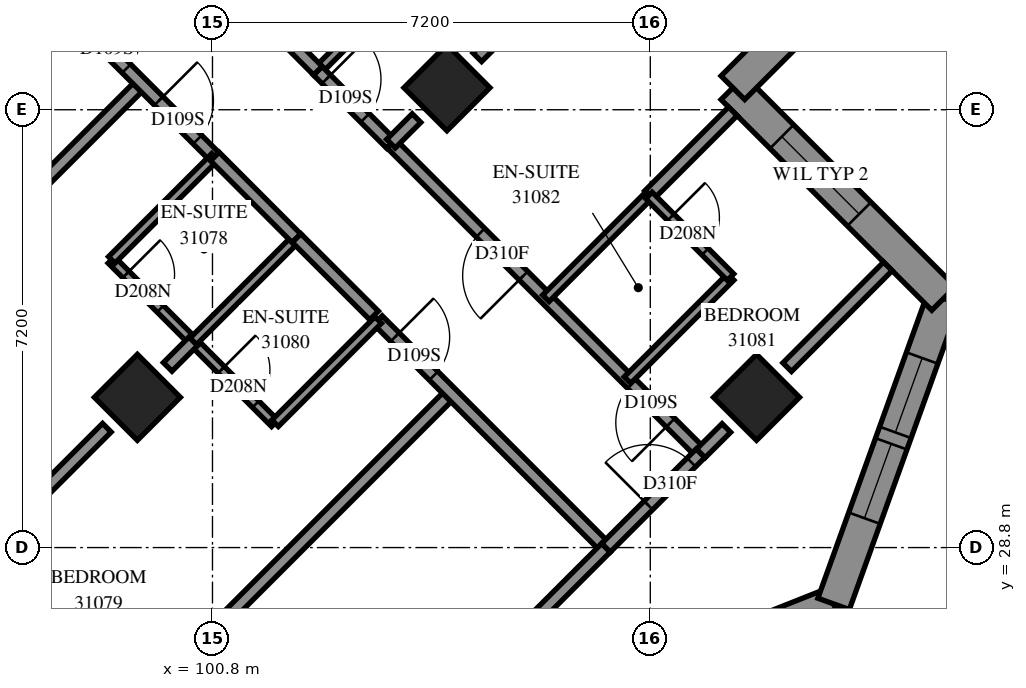
"""IFC4 building model, lengths in metres.
Left out: names, types, materials, properties, quantities, classifications, styles, units other than length and angle.
Written with IfcOpenShell. Run it as: python <this file> out.ifc"""

import sys

from ifc_helpers import new_model, si_unit, direction, frame, frame_2d, origin, origin_2d, place, context, subcontext, project, spatial, polyline, rectangle, outline, extrude, element, fill, save


model = new_model("IFC4")
c1 = context("Model", 3, precision=1e-05, world=origin(), true_north=direction((0.0, 1.0)))
c2 = subcontext(c1, "Body", "Model", "MODEL_VIEW")
j1 = project(units=[si_unit("LENGTHUNIT", "METRE"), si_unit("PLANEANGLEUNIT", "RADIAN")], contexts=[c1])
p1 = place(None, origin())
s1 = spatial("IfcSite", under=j1, at=p1, CompositionType="ELEMENT")
p2 = place(p1, origin())
s2 = spatial("IfcBuilding", under=s1, at=p2, CompositionType="ELEMENT")
p3 = place(p2, frame((0.0, 0.0, 115.2)))
s3 = spatial("IfcBuildingStorey", under=s2, at=p3, CompositionType="ELEMENT", Elevation=115.2)
for number, where, z_axis, x_axis in (
    (1, (104.656, 36.362, 0.0), (0.0, 0.0, 1.0), (0.707, -0.707, 0.0)),
    (2, (99.565, 31.271, 0.0), (0.0, 0.0, 1.0), (0.707, -0.707, 0.0)),
    (3, (109.747, 31.271, 0.0), (0.0, 0.0, 1.0), (0.707, -0.707, 0.0)),
):
    element("IfcColumn", number, at=place(p3, frame(where, z_axis=z_axis, x_axis=x_axis)), inside=s3, PredefinedType="COLUMN", context=c2, shape_type="SweptSolid", body=[
        extrude(rectangle(XDim=1.0, YDim=1.0, at=origin_2d()), origin(), (0.0, 0.0, 1.0), 3.1),
    ])
p4 = place(p3, frame((105.857, 25.825, 0.0), z_axis=(0.0, 0.0, 1.0), x_axis=(0.9293292169, 0.3692522262, 0.0)))
e4 = element("IfcWall", 4, at=p4, inside=s3, PredefinedType="SOLIDWALL", context=c2, shape_type="SweptSolid", body=[
    extrude(outline(polyline([(0.119, -0.275), (5.674, -0.275), (5.426, 0.275), (-0.119, 0.275), (0.119, -0.275)])), origin(), (0.0, 0.0, 1.0), 3.1),
])
p5 = place(p4, frame((0.653, 0.0, 0.5)))
e5 = element("IfcOpeningElement", 5, at=p5, cuts=e4, PredefinedType="OPENING", context=c2, shape_type="SweptSolid", body=[
    extrude(rectangle(XDim=1.2, YDim=2.45, at=frame_2d((0.6, 1.225))), frame((0.0, 0.285, 0.0), z_axis=(0.0, -1.0, 0.0), x_axis=(1.0, 0.0, 0.0)), (0.0, 0.0, 1.0), 0.57),
])
p6 = place(p4, frame((3.166, 0.0, 0.5)))
e6 = element("IfcOpeningElement", 6, at=p6, cuts=e4, PredefinedType="OPENING", context=c2, shape_type="SweptSolid", body=[
    extrude(rectangle(XDim=1.2, YDim=2.45, at=frame_2d((0.6, 1.225))), frame((0.0, 0.285, 0.0), z_axis=(0.0, -1.0, 0.0), x_axis=(1.0, 0.0, 0.0)), (0.0, 0.0, 1.0), 0.57),
])
p7 = place(p3, frame((111.015, 27.874, 0.0), z_axis=(0.0, 0.0, 1.0), x_axis=(0.3387725306, 0.9408683077, 0.0)))
e7 = element("IfcWall", 7, at=p7, inside=s3, PredefinedType="SOLIDWALL", context=c2, shape_type="SweptSolid", body=[
    extrude(outline(polyline([(-0.124, -0.275), (5.513, -0.275), (5.164, 0.275), (0.124, 0.275), (-0.124, -0.275)])), origin(), (0.0, 0.0, 1.0), 3.1),
])
p8 = place(p7, frame((1.498, 0.0, 0.5)))
e8 = element("IfcOpeningElement", 8, at=p8, cuts=e7, PredefinedType="OPENING", context=c2, shape_type="SweptSolid", body=[
    extrude(rectangle(XDim=1.3, YDim=2.45, at=frame_2d((0.65, 1.225))), frame((0.0, 0.285, 0.0), z_axis=(0.0, -1.0, 0.0), x_axis=(1.0, 0.0, 0.0)), (0.0, 0.0, 1.0), 0.57),
])
p9 = place(p7, frame((2.998, 0.0, 0.5)))
e9 = element("IfcOpeningElement", 9, at=p9, cuts=e7, PredefinedType="OPENING", context=c2, shape_type="SweptSolid", body=[
    extrude(rectangle(XDim=1.3, YDim=2.45, at=frame_2d((0.65, 1.225))), frame((0.0, 0.285, 0.0), z_axis=(0.0, -1.0, 0.0), x_axis=(1.0, 0.0, 0.0)), (0.0, 0.0, 1.0), 0.57),
])
p10 = place(p3, frame((112.823, 32.897, 0.0), z_axis=(0.0, 0.0, 1.0), x_axis=(-0.7071067812, 0.7071067812, 0.0)))
e10 = element("IfcWall", 10, at=p10, inside=s3, PredefinedType="SOLIDWALL", context=c2, shape_type="SweptSolid", body=[
    extrude(outline(polyline([(-0.174, -0.275), (4.625, -0.275), (5.176, 0.275), (0.174, 0.275), (-0.174, -0.275)])), origin(), (0.0, 0.0, 1.0), 3.1),
])
p11 = place(p10, frame((1.963, 0.0, 0.6)))
e11 = element("IfcOpeningElement", 11, at=p11, cuts=e10, PredefinedType="OPENING", context=c2, shape_type="SweptSolid", body=[
    extrude(rectangle(XDim=1.8, YDim=1.9, at=frame_2d((0.9, 0.95))), frame((0.0, 0.285, 0.0), z_axis=(0.0, -1.0, 0.0), x_axis=(1.0, 0.0, 0.0)), (0.0, 0.0, 1.0), 0.57),
])
p12 = place(p3, frame((109.358, 36.362, 0.0), z_axis=(0.0, 0.0, 1.0), x_axis=(0.7071067812, 0.7071067812, 0.0)))
e12 = element("IfcWall", 12, at=p12, inside=s3, PredefinedType="SOLIDWALL", context=c2, shape_type="SweptSolid", body=[
    extrude(outline(polyline([(0.275, -0.275), (6.278, -0.275), (5.501, 0.275), (-0.275, 0.275), (0.275, -0.275)])), origin(), (0.0, 0.0, 1.0), 3.1),
])
p13 = place(p12, frame((1.137, 0.0, 0.6)))
e13 = element("IfcOpeningElement", 13, at=p13, cuts=e12, PredefinedType="OPENING", context=c2, shape_type="SweptSolid", body=[
    extrude(rectangle(XDim=1.8, YDim=1.9, at=frame_2d((0.9, 0.95))), frame((0.0, 0.285, 0.0), z_axis=(0.0, -1.0, 0.0), x_axis=(1.0, 0.0, 0.0)), (0.0, 0.0, 1.0), 0.57),
])
p14 = place(p12, frame((3.988, 0.0, 0.6)))
e14 = element("IfcOpeningElement", 14, at=p14, cuts=e12, PredefinedType="OPENING", context=c2, shape_type="SweptSolid", body=[
    extrude(rectangle(XDim=1.2, YDim=1.9, at=frame_2d((0.6, 0.95))), frame((0.0, 0.285, 0.0), z_axis=(0.0, -1.0, 0.0), x_axis=(1.0, 0.0, 0.0)), (0.0, 0.0, 1.0), 0.57),
])
p15 = place(p3, frame((96.469, 23.086, 0.0), z_axis=(0.0, 0.0, 1.0), x_axis=(0.7071067812, 0.7071067812, 0.0)))
e15 = element("IfcWall", 15, at=p15, inside=s3, PredefinedType="PARTITIONING", context=c2, shape_type="SweptSolid", body=[
    extrude(rectangle(XDim=11.677, YDim=0.2, at=frame_2d((5.838, 0.0))), origin(), (0.0, 0.0, 1.0), 3.1),
])
p16 = place(p3, frame((91.451, 28.249, 0.0), z_axis=(0.0, 0.0, 1.0), x_axis=(0.7071067812, 0.7071067812, 0.0)))
e16 = element("IfcWall", 16, at=p16, inside=s3, PredefinedType="PARTITIONING", context=c2, shape_type="SweptSolid", body=[
    extrude(rectangle(XDim=11.574, YDim=0.2, at=frame_2d((5.787, 0.0))), origin(), (0.0, 0.0, 1.0), 3.1),
])
p17 = place(p3, frame((94.047, 42.015, 0.0), z_axis=(0.0, 0.0, 1.0), x_axis=(0.7071067812, -0.7071067812, 0.0)))
e17 = element("IfcWall", 17, at=p17, inside=s3, PredefinedType="PARTITIONING", context=c2, shape_type="SweptSolid", body=[
    extrude(rectangle(XDim=9.6, YDim=0.2, at=frame_2d((4.8, 0.0))), origin(), (0.0, 0.0, 1.0), 3.1),
])
p18 = place(p17, frame((1.099, 0.0, 0.0)))
e18 = element("IfcOpeningElement", 18, at=p18, cuts=e17, PredefinedType="OPENING", context=c2, shape_type="SweptSolid", body=[
    extrude(rectangle(XDim=0.9, YDim=2.1, at=frame_2d((0.45, 1.05))), frame((0.0, 0.11, 0.0), z_axis=(0.0, -1.0, 0.0), x_axis=(1.0, 0.0, 0.0)), (0.0, 0.0, 1.0), 0.22),
])
p19 = place(p17, frame((6.649, 0.0, 0.0)))
e19 = element("IfcOpeningElement", 19, at=p19, cuts=e17, PredefinedType="OPENING", context=c2, shape_type="SweptSolid", body=[
    extrude(rectangle(XDim=0.9, YDim=2.1, at=frame_2d((0.45, 1.05))), frame((0.0, 0.11, 0.0), z_axis=(0.0, -1.0, 0.0), x_axis=(1.0, 0.0, 0.0)), (0.0, 0.0, 1.0), 0.22),
])
p20 = place(p17, frame((8.3, 0.0, 0.0)))
e20 = element("IfcOpeningElement", 20, at=p20, cuts=e17, PredefinedType="OPENING", context=c2, shape_type="SweptSolid", body=[
    extrude(rectangle(XDim=0.9, YDim=2.1, at=frame_2d((0.45, 1.05))), frame((0.0, 0.11, 0.0), z_axis=(0.0, -1.0, 0.0), x_axis=(1.0, 0.0, 0.0)), (0.0, 0.0, 1.0), 0.22),
])
p21 = place(p3, frame((108.831, 30.355, 0.0), z_axis=(0.0, 0.0, 1.0), x_axis=(-0.7073012053, 0.7069123036, 0.0)))
e21 = element("IfcWall", 21, at=p21, inside=s3, PredefinedType="PARTITIONING", context=c2, shape_type="SweptSolid", body=[
    extrude(rectangle(XDim=7.2, YDim=0.2, at=frame_2d((3.6, 0.0))), origin(), (0.0, 0.0, 1.0), 2.6),
])
p22 = place(p21, frame((4.125, 0.0, 0.0)))
e22 = element("IfcOpeningElement", 22, at=p22, cuts=e21, PredefinedType="OPENING", context=c2, shape_type="SweptSolid", body=[
    extrude(rectangle(XDim=1.0, YDim=2.1, at=frame_2d((0.5, 1.05))), frame((0.0, 0.11, 0.0), z_axis=(0.0, -1.0, 0.0), x_axis=(1.0, 0.0, 0.0)), (0.0, 0.0, 1.0), 0.22),
])
p23 = place(p21, frame((0.705, 0.0, 0.0)))
e23 = element("IfcOpeningElement", 23, at=p23, cuts=e21, PredefinedType="OPENING", context=c2, shape_type="SweptSolid", body=[
    extrude(rectangle(XDim=0.9, YDim=2.1, at=frame_2d((0.45, 1.05))), frame((0.0, 0.11, 0.0), z_axis=(0.0, -1.0, 0.0), x_axis=(1.0, 0.0, 0.0)), (0.0, 0.0, 1.0), 0.22),
])
p24 = place(p3, frame((105.155, 36.863, 0.0), z_axis=(0.0, 0.0, 1.0), x_axis=(0.7071067812, 0.7071067812, 0.0)))
e24 = element("IfcWall", 24, at=p24, inside=s3, PredefinedType="PARTITIONING", context=c2, shape_type="SweptSolid", body=[
    extrude(rectangle(XDim=5.787, YDim=0.2, at=frame_2d((2.893, 0.0))), origin(), (0.0, 0.0, 1.0), 3.1),
])
p25 = place(p3, frame((94.973, 26.681, 0.0), z_axis=(0.0, 0.0, 1.0), x_axis=(0.7071067812, 0.7071067812, 0.0)))
e25 = element("IfcWall", 25, at=p25, inside=s3, PredefinedType="PARTITIONING", context=c2, shape_type="SweptSolid", body=[
    extrude(rectangle(XDim=5.784, YDim=0.2, at=frame_2d((2.892, 0.0))), origin(), (0.0, 0.0, 1.0), 3.1),
])
p26 = place(p3, frame((103.521, 32.541, 0.0), z_axis=(0.0, 0.0, 1.0), x_axis=(0.7071067812, -0.7071067812, 0.0)))
e26 = element("IfcWall", 26, at=p26, inside=s3, PredefinedType="PARTITIONING", context=c2, shape_type="SweptSolid", body=[
    extrude(rectangle(XDim=5.301, YDim=0.2, at=frame_2d((2.65, 0.0))), origin(), (0.0, 0.0, 1.0), 3.1),
])
p27 = place(p26, frame((0.396, 0.0, 0.0)))
e27 = element("IfcOpeningElement", 27, at=p27, cuts=e26, PredefinedType="OPENING", context=c2, shape_type="SweptSolid", body=[
    extrude(rectangle(XDim=0.9, YDim=2.1, at=frame_2d((0.45, 1.05))), frame((0.0, 0.11, 0.0), z_axis=(0.0, -1.0, 0.0), x_axis=(1.0, 0.0, 0.0)), (0.0, 0.0, 1.0), 0.22),
])
p28 = place(p3, frame((99.137, 33.531, 0.0), z_axis=(0.0, 0.0, 1.0), x_axis=(0.7071067812, -0.7071067812, 0.0)))
e28 = element("IfcWall", 28, at=p28, inside=s3, PredefinedType="PARTITIONING", context=c2, shape_type="SweptSolid", body=[
    extrude(rectangle(XDim=3.801, YDim=0.15, at=frame_2d((1.901, 0.0))), origin(), (0.0, 0.0, 1.0), 3.1),
])
p29 = place(p28, frame((0.339, 0.0, 0.0)))
e29 = element("IfcOpeningElement", 29, at=p29, cuts=e28, PredefinedType="OPENING", context=c2, shape_type="SweptSolid", body=[
    extrude(rectangle(XDim=0.8, YDim=2.1, at=frame_2d((0.4, 1.05))), frame((0.0, 0.085, 0.0), z_axis=(0.0, -1.0, 0.0), x_axis=(1.0, 0.0, 0.0)), (0.0, 0.0, 1.0), 0.17),
])
p30 = place(p28, frame((2.557, 0.0, 0.0)))
e30 = element("IfcOpeningElement", 30, at=p30, cuts=e28, PredefinedType="OPENING", context=c2, shape_type="SweptSolid", body=[
    extrude(rectangle(XDim=0.8, YDim=2.1, at=frame_2d((0.4, 1.05))), frame((0.0, 0.085, 0.0), z_axis=(0.0, -1.0, 0.0), x_axis=(1.0, 0.0, 0.0)), (0.0, 0.0, 1.0), 0.17),
])
p31 = place(p3, frame((105.155, 26.681, 0.0), z_axis=(0.0, 0.0, 1.0), x_axis=(0.7071067812, 0.7071067812, 0.0)))
e31 = element("IfcWall", 31, at=p31, inside=s3, PredefinedType="PARTITIONING", context=c2, shape_type="SweptSolid", body=[
    extrude(rectangle(XDim=2.993, YDim=0.2, at=frame_2d((1.496, 0.0))), origin(), (0.0, 0.0, 1.0), 2.6),
])
p32 = place(p3, frame((102.533, 36.645, 0.0), z_axis=(0.0, 0.0, 1.0), x_axis=(0.7071067812, 0.7071067812, 0.0)))
e32 = element("IfcWall", 32, at=p32, inside=s3, PredefinedType="PARTITIONING", context=c2, shape_type="SweptSolid", body=[
    extrude(rectangle(XDim=2.401, YDim=0.15, at=frame_2d((1.201, 0.0))), origin(), (0.0, 0.0, 1.0), 3.1),
])
for number, where, z_axis, x_axis in (
    (33, (96.739, 35.935, 0.0), (0.0, 0.0, 1.0), (0.708, 0.707, 0.0)),
    (34, (99.143, 33.531, 0.0), (0.0, 0.0, 1.0), (0.708, 0.707, 0.0)),
    (35, (101.83, 30.844, 0.0), (0.0, 0.0, 1.0), (0.707, 0.708, 0.0)),
):
    element("IfcWall", number, at=place(p3, frame(where, z_axis=z_axis, x_axis=x_axis)), inside=s3, PredefinedType="PARTITIONING", context=c2, shape_type="SweptSolid", body=[
        extrude(rectangle(XDim=2.4, YDim=0.15, at=frame_2d((1.2, 0.0))), origin(), (0.0, 0.0, 1.0), 3.1),
    ])
for number, where, z_axis, x_axis in (
    (36, (100.483, 32.191, 0.0), (0.0, 0.0, 1.0), (0.707, 0.707, 0.0)),
    (37, (106.283, 32.899, 0.0), (0.0, 0.0, 1.0), (0.707, 0.707, 0.0)),
):
    element("IfcWall", number, at=place(p3, frame(where, z_axis=z_axis, x_axis=x_axis)), inside=s3, PredefinedType="PARTITIONING", context=c2, shape_type="SweptSolid", body=[
        extrude(rectangle(XDim=2.398, YDim=0.15, at=frame_2d((1.199, 0.0))), origin(), (0.0, 0.0, 1.0), 3.1),
    ])
p33 = place(p3, frame((107.625, 31.555, 0.0), z_axis=(0.0, 0.0, 1.0), x_axis=(0.7071067812, 0.7071067812, 0.0)))
e38 = element("IfcWall", 38, at=p33, inside=s3, PredefinedType="PARTITIONING", context=c2, shape_type="SweptSolid", body=[
    extrude(rectangle(XDim=2.398, YDim=0.15, at=frame_2d((1.199, 0.0))), origin(), (0.0, 0.0, 1.0), 2.6),
])
p34 = place(p3, frame((110.251, 31.767, 0.0), z_axis=(0.0, 0.0, 1.0), x_axis=(0.7066584143, 0.7075548639, 0.0)))
e39 = element("IfcWall", 39, at=p34, inside=s3, PredefinedType="PARTITIONING", context=c2, shape_type="SweptSolid", body=[
    extrude(rectangle(XDim=2.343, YDim=0.2, at=frame_2d((1.171, 0.0))), origin(), (0.0, 0.0, 1.0), 3.1),
])
p35 = place(p3, frame((107.271, 28.797, 0.0), z_axis=(0.0, 0.0, 1.0), x_axis=(0.7071067812, 0.7071067812, 0.0)))
e40 = element("IfcWall", 40, at=p35, inside=s3, PredefinedType="PARTITIONING", context=c2, shape_type="SweptSolid", body=[
    extrude(rectangle(XDim=2.2, YDim=0.2, at=frame_2d((1.1, 0.0))), origin(), (0.0, 0.0, 1.0), 2.6),
])
p36 = place(p35, frame((0.987, 0.0, 0.0)))
e41 = element("IfcOpeningElement", 41, at=p36, cuts=e40, PredefinedType="OPENING", context=c2, shape_type="SweptSolid", body=[
    extrude(rectangle(XDim=1.0, YDim=2.1, at=frame_2d((0.5, 1.05))), frame((0.0, 0.11, 0.0), z_axis=(0.0, -1.0, 0.0), x_axis=(1.0, 0.0, 0.0)), (0.0, 0.0, 1.0), 0.22),
])
p37 = place(p3, frame((107.979, 34.595, 0.0), z_axis=(0.0, 0.0, 1.0), x_axis=(0.7071067812, 0.7071067812, 0.0)))
e42 = element("IfcWall", 42, at=p37, inside=s3, PredefinedType="PARTITIONING", context=c2, shape_type="SweptSolid", body=[
    extrude(rectangle(XDim=1.95, YDim=0.2, at=frame_2d((0.975, 0.0))), origin(), (0.0, 0.0, 1.0), 3.1),
])
p38 = place(p3, frame((100.839, 35.231, 0.0), z_axis=(0.0, 0.0, 1.0), x_axis=(0.7065800724, -0.7076330979, 0.0)))
e43 = element("IfcWall", 43, at=p38, inside=s3, PredefinedType="PARTITIONING", context=c2, shape_type="SweptSolid", body=[
    extrude(rectangle(XDim=1.899, YDim=0.2, at=frame_2d((0.95, 0.0))), origin(), (0.0, 0.0, 1.0), 3.1),
])
p39 = place(p3, frame((107.977, 34.591, 0.0), z_axis=(0.0, 0.0, 1.0), x_axis=(0.7065800724, -0.7076330979, 0.0)))
e44 = element("IfcWall", 44, at=p39, inside=s3, PredefinedType="PARTITIONING", context=c2, shape_type="SweptSolid", body=[
    extrude(rectangle(XDim=1.899, YDim=0.15, at=frame_2d((0.95, 0.0))), origin(), (0.0, 0.0, 1.0), 3.1),
])
p40 = place(p39, frame((0.508, 0.0, 0.0)))
e45 = element("IfcOpeningElement", 45, at=p40, cuts=e44, PredefinedType="OPENING", context=c2, shape_type="SweptSolid", body=[
    extrude(rectangle(XDim=0.8, YDim=2.1, at=frame_2d((0.4, 1.05))), frame((0.0, 0.085, 0.0), z_axis=(0.0, -1.0, 0.0), x_axis=(1.0, 0.0, 0.0)), (0.0, 0.0, 1.0), 0.17),
])
p41 = place(p3, frame((102.183, 33.889, 0.0), z_axis=(0.0, 0.0, 1.0), x_axis=(0.7076620277, -0.7065510983, 0.0)))
e46 = element("IfcWall", 46, at=p41, inside=s3, PredefinedType="PARTITIONING", context=c2, shape_type="SweptSolid", body=[
    extrude(rectangle(XDim=1.8, YDim=0.2, at=frame_2d((0.9, 0.0))), origin(), (0.0, 0.0, 1.0), 3.1),
])
p42 = place(p3, frame((102.531, 36.641, 0.0), z_axis=(0.0, 0.0, 1.0), x_axis=(0.7071067812, -0.7071067812, 0.0)))
e47 = element("IfcWall", 47, at=p42, inside=s3, PredefinedType="PARTITIONING", context=c2, shape_type="SweptSolid", body=[
    extrude(rectangle(XDim=1.7, YDim=0.2, at=frame_2d((0.85, 0.0))), origin(), (0.0, 0.0, 1.0), 3.1),
])
p43 = place(p42, frame((0.198, 0.0, 0.0)))
e48 = element("IfcOpeningElement", 48, at=p43, cuts=e47, PredefinedType="OPENING", context=c2, shape_type="SweptSolid", body=[
    extrude(rectangle(XDim=0.9, YDim=2.1, at=frame_2d((0.45, 1.05))), frame((0.0, 0.11, 0.0), z_axis=(0.0, -1.0, 0.0), x_axis=(1.0, 0.0, 0.0)), (0.0, 0.0, 1.0), 0.22),
])
p44 = place(p3, frame((102.103, 37.075, 0.0), z_axis=(0.0, 0.0, 1.0), x_axis=(0.7054642634, -0.7087454925, 0.0)))
e49 = element("IfcWall", 49, at=p44, inside=s3, PredefinedType="PARTITIONING", context=c2, shape_type="SweptSolid", body=[
    extrude(rectangle(XDim=0.61, YDim=0.2, at=frame_2d((0.305, 0.0))), origin(), (0.0, 0.0, 1.0), 3.1),
])
for number, where, z_axis, x_axis in (
    (50, (100.063, 31.771, 0.0), (0.0, 0.0, 1.0), (0.707, 0.707, 0.0)),
    (51, (103.735, 35.443, 0.0), (0.0, 0.0, 1.0), (0.707, 0.707, 0.0)),
):
    element("IfcWall", number, at=place(p3, frame(where, z_axis=z_axis, x_axis=x_axis)), inside=s3, PredefinedType="PARTITIONING", context=c2, shape_type="SweptSolid", body=[
        extrude(rectangle(XDim=0.594, YDim=0.2, at=frame_2d((0.297, 0.0))), origin(), (0.0, 0.0, 1.0), 3.1),
    ])
p45 = place(p3, frame((108.831, 30.349, 0.0), z_axis=(0.0, 0.0, 1.0), x_axis=(0.7087923682, 0.7054171665, 0.0)))
e52 = element("IfcWall", 52, at=p45, inside=s3, PredefinedType="PARTITIONING", context=c2, shape_type="SweptSolid", body=[
    extrude(rectangle(XDim=0.593, YDim=0.2, at=frame_2d((0.296, 0.0))), origin(), (0.0, 0.0, 1.0), 2.6),
])
p46 = place(p8, origin())
e53 = element("IfcWindow", 53, at=p46, inside=s3, PartitioningType="SINGLE_PANEL", PredefinedType="WINDOW", context=c2, shape_type="SweptSolid", body=[
    extrude(rectangle(XDim=1.3, YDim=2.45, at=frame_2d((0.65, 1.225))), frame((0.0, 0.155, 0.0), z_axis=(0.0, -1.0, 0.0), x_axis=(1.0, 0.0, 0.0)), (0.0, 0.0, 1.0), 0.06),
])
fill(e8, e53)
p47 = place(p9, origin())
e54 = element("IfcWindow", 54, at=p47, inside=s3, PartitioningType="SINGLE_PANEL", PredefinedType="WINDOW", context=c2, shape_type="SweptSolid", body=[
    extrude(rectangle(XDim=1.3, YDim=2.45, at=frame_2d((0.65, 1.225))), frame((0.0, 0.155, 0.0), z_axis=(0.0, -1.0, 0.0), x_axis=(1.0, 0.0, 0.0)), (0.0, 0.0, 1.0), 0.06),
])
fill(e9, e54)
p48 = place(p11, origin())
e55 = element("IfcWindow", 55, at=p48, inside=s3, PartitioningType="SINGLE_PANEL", PredefinedType="WINDOW", context=c2, shape_type="SweptSolid", body=[
    extrude(rectangle(XDim=1.8, YDim=1.9, at=frame_2d((0.9, 0.95))), frame((0.0, 0.155, 0.0), z_axis=(0.0, -1.0, 0.0), x_axis=(1.0, 0.0, 0.0)), (0.0, 0.0, 1.0), 0.06),
])
fill(e11, e55)
p49 = place(p22, origin())
e56 = element("IfcDoor", 56, at=p49, inside=s3, OperationType="SINGLE_SWING_LEFT", PredefinedType="DOOR", context=c2, shape_type="SweptSolid", body=[
    extrude(rectangle(XDim=1.0, YDim=2.1, at=frame_2d((0.5, 1.05))), frame((0.0, 0.025, 0.0), z_axis=(0.0, -1.0, 0.0), x_axis=(1.0, 0.0, 0.0)), (0.0, 0.0, 1.0), 0.05),
])
fill(e22, e56)
p50 = place(p43, origin())
e57 = element("IfcDoor", 57, at=p50, inside=s3, OperationType="SINGLE_SWING_RIGHT", PredefinedType="DOOR", context=c2, shape_type="SweptSolid", body=[
    extrude(rectangle(XDim=0.9, YDim=2.1, at=frame_2d((0.45, 1.05))), frame((0.0, 0.025, 0.0), z_axis=(0.0, -1.0, 0.0), x_axis=(1.0, 0.0, 0.0)), (0.0, 0.0, 1.0), 0.05),
])
fill(e48, e57)
p51 = place(p19, origin())
e58 = element("IfcDoor", 58, at=p51, inside=s3, OperationType="SINGLE_SWING_RIGHT", PredefinedType="DOOR", context=c2, shape_type="SweptSolid", body=[
    extrude(rectangle(XDim=0.9, YDim=2.1, at=frame_2d((0.45, 1.05))), frame((0.0, 0.025, 0.0), z_axis=(0.0, -1.0, 0.0), x_axis=(1.0, 0.0, 0.0)), (0.0, 0.0, 1.0), 0.05),
])
fill(e19, e58)
p52 = place(p20, origin())
e59 = element("IfcDoor", 59, at=p52, inside=s3, OperationType="SINGLE_SWING_LEFT", PredefinedType="DOOR", context=c2, shape_type="SweptSolid", body=[
    extrude(rectangle(XDim=0.9, YDim=2.1, at=frame_2d((0.45, 1.05))), frame((0.0, 0.025, 0.0), z_axis=(0.0, -1.0, 0.0), x_axis=(1.0, 0.0, 0.0)), (0.0, 0.0, 1.0), 0.05),
])
fill(e20, e59)
p53 = place(p29, origin())
e60 = element("IfcDoor", 60, at=p53, inside=s3, OperationType="SINGLE_SWING_RIGHT", PredefinedType="DOOR", context=c2, shape_type="SweptSolid", body=[
    extrude(rectangle(XDim=0.8, YDim=2.1, at=frame_2d((0.4, 1.05))), frame((0.0, 0.025, 0.0), z_axis=(0.0, -1.0, 0.0), x_axis=(1.0, 0.0, 0.0)), (0.0, 0.0, 1.0), 0.05),
])
fill(e29, e60)
p54 = place(p27, origin())
e61 = element("IfcDoor", 61, at=p54, inside=s3, OperationType="SINGLE_SWING_RIGHT", PredefinedType="DOOR", context=c2, shape_type="SweptSolid", body=[
    extrude(rectangle(XDim=0.9, YDim=2.1, at=frame_2d((0.45, 1.05))), frame((0.0, 0.025, 0.0), z_axis=(0.0, -1.0, 0.0), x_axis=(1.0, 0.0, 0.0)), (0.0, 0.0, 1.0), 0.05),
])
fill(e27, e61)
p55 = place(p30, origin())
e62 = element("IfcDoor", 62, at=p55, inside=s3, OperationType="SINGLE_SWING_RIGHT", PredefinedType="DOOR", context=c2, shape_type="SweptSolid", body=[
    extrude(rectangle(XDim=0.8, YDim=2.1, at=frame_2d((0.4, 1.05))), frame((0.0, 0.025, 0.0), z_axis=(0.0, -1.0, 0.0), x_axis=(1.0, 0.0, 0.0)), (0.0, 0.0, 1.0), 0.05),
])
fill(e30, e62)
p56 = place(p23, origin())
e63 = element("IfcDoor", 63, at=p56, inside=s3, OperationType="SINGLE_SWING_RIGHT", PredefinedType="DOOR", context=c2, shape_type="SweptSolid", body=[
    extrude(rectangle(XDim=0.9, YDim=2.1, at=frame_2d((0.45, 1.05))), frame((0.0, 0.025, 0.0), z_axis=(0.0, -1.0, 0.0), x_axis=(1.0, 0.0, 0.0)), (0.0, 0.0, 1.0), 0.05),
])
fill(e23, e63)
p57 = place(p40, origin())
e64 = element("IfcDoor", 64, at=p57, inside=s3, OperationType="SINGLE_SWING_RIGHT", PredefinedType="DOOR", context=c2, shape_type="SweptSolid", body=[
    extrude(rectangle(XDim=0.8, YDim=2.1, at=frame_2d((0.4, 1.05))), frame((0.0, 0.025, 0.0), z_axis=(0.0, -1.0, 0.0), x_axis=(1.0, 0.0, 0.0)), (0.0, 0.0, 1.0), 0.05),
])
fill(e45, e64)
p58 = place(p36, origin())
e65 = element("IfcDoor", 65, at=p58, inside=s3, OperationType="SINGLE_SWING_RIGHT", PredefinedType="DOOR", context=c2, shape_type="SweptSolid", body=[
    extrude(rectangle(XDim=1.0, YDim=2.1, at=frame_2d((0.5, 1.05))), frame((0.0, 0.025, 0.0), z_axis=(0.0, -1.0, 0.0), x_axis=(1.0, 0.0, 0.0)), (0.0, 0.0, 1.0), 0.05),
])
fill(e41, e65)
save(model, sys.argv[1])
